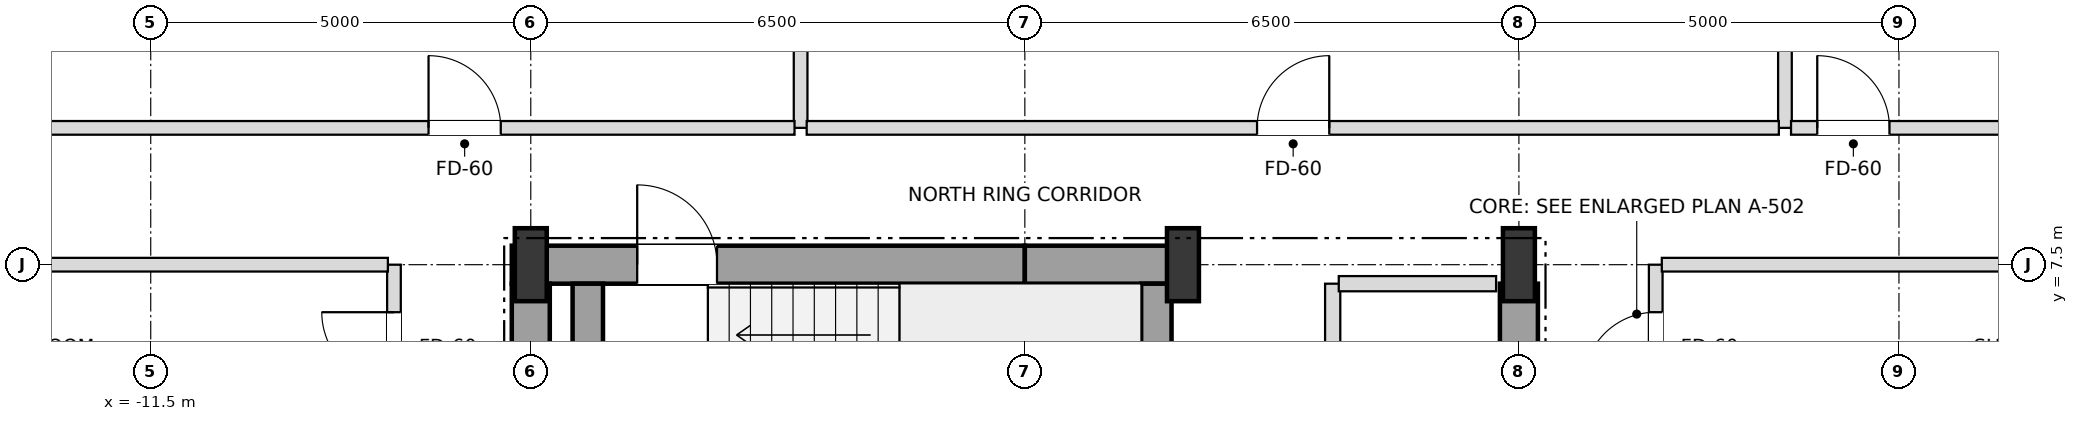
"""IFC4 building model, lengths in metres.
Left out: names, types, materials, properties, quantities, classifications, styles, units other than length and angle.
Written with IfcOpenShell. Run it as: python <this file> out.ifc"""

import sys

from ifc_helpers import new_model, si_unit, direction, frame, frame_2d, origin, origin_2d, place, context, subcontext, project, spatial, rectangle, i_section, extrude, element, fill, save


model = new_model("IFC4")
c1 = context("Model", 3, precision=1e-05, world=origin(), true_north=direction((0.0, 1.0)))
c2 = subcontext(c1, "Body", "Model", "MODEL_VIEW")
j1 = project(units=[si_unit("LENGTHUNIT", "METRE"), si_unit("PLANEANGLEUNIT", "RADIAN")], contexts=[c1])
p1 = place(None, origin())
s1 = spatial("IfcSite", under=j1, at=p1, CompositionType="ELEMENT")
p2 = place(p1, origin())
s2 = spatial("IfcBuilding", under=s1, at=p2, CompositionType="ELEMENT")
p3 = place(p2, frame((0.0, 0.0, 79.2)))
s3 = spatial("IfcBuildingStorey", under=s2, at=p3, CompositionType="ELEMENT", Elevation=79.2)
for number, where, z_axis, x_axis in (
    (1, (-6.5, 7.5, 0.0), (0.0, 0.0, 1.0), (1.0, 0.0, 0.0)),
    (2, (2.08, 7.5, 0.0), (0.0, 0.0, 1.0), (1.0, 0.0, 0.0)),
    (3, (6.5, 7.5, 0.0), (0.0, 0.0, 1.0), (1.0, 0.0, 0.0)),
):
    element("IfcColumn", number, at=place(p3, frame(where, z_axis=z_axis, x_axis=x_axis)), inside=s3, PredefinedType="COLUMN", context=c2, shape_type="SweptSolid", body=[
        extrude(i_section(OverallWidth=0.42, OverallDepth=0.96, WebThickness=0.022, FlangeThickness=0.034, at=origin_2d()), origin(), (0.0, 0.0, 1.0), 3.6),
    ])
p4 = place(p3, frame((-6.75, 7.5, 0.0), z_axis=(0.0, 0.0, 1.0), x_axis=(1.0, 0.0, 0.0)))
e4 = element("IfcWall", 4, at=p4, inside=s3, PredefinedType="SHEAR", context=c2, shape_type="SweptSolid", body=[
    extrude(rectangle(XDim=6.75, YDim=0.5, at=frame_2d((3.375, 0.0))), origin(), (0.0, 0.0, 1.0), 3.38),
])
p5 = place(p4, frame((1.65, 0.0, 0.0)))
e5 = element("IfcOpeningElement", 5, at=p5, cuts=e4, PredefinedType="OPENING", context=c2, shape_type="SweptSolid", body=[
    extrude(rectangle(XDim=1.05, YDim=2.15, at=frame_2d((0.525, 1.075))), frame((0.0, 0.26, 0.0), z_axis=(0.0, -1.0, 0.0), x_axis=(1.0, 0.0, 0.0)), (0.0, 0.0, 1.0), 0.52),
])
p6 = place(p3, frame((0.0, 7.5, 0.0), z_axis=(0.0, 0.0, 1.0), x_axis=(1.0, 0.0, 0.0)))
e6 = element("IfcWall", 6, at=p6, inside=s3, PredefinedType="SHEAR", context=c2, shape_type="SweptSolid", body=[
    extrude(rectangle(XDim=2.08, YDim=0.5, at=frame_2d((1.04, 0.0))), origin(), (0.0, 0.0, 1.0), 3.38),
])
for number, where, z_axis, x_axis in (
    (7, (-6.5, 3.95, 0.0), (0.0, 0.0, 1.0), (0.0, 1.0, 0.0)),
    (8, (6.5, 3.95, 0.0), (0.0, 0.0, 1.0), (0.0, 1.0, 0.0)),
):
    element("IfcWall", number, at=place(p3, frame(where, z_axis=z_axis, x_axis=x_axis)), inside=s3, PredefinedType="SHEAR", context=c2, shape_type="SweptSolid", body=[
        extrude(rectangle(XDim=3.3, YDim=0.5, at=frame_2d((1.65, 0.0))), origin(), (0.0, 0.0, 1.0), 3.38),
    ])
for number, where, z_axis, x_axis in (
    (9, (1.73, 3.95, 0.0), (0.0, 0.0, 1.0), (0.0, 1.0, 0.0)),
    (10, (-5.75, 3.95, 0.0), (0.0, 0.0, 1.0), (0.0, 1.0, 0.0)),
):
    element("IfcWall", number, at=place(p3, frame(where, z_axis=z_axis, x_axis=x_axis)), inside=s3, PredefinedType="SHEAR", context=c2, shape_type="SweptSolid", body=[
        extrude(rectangle(XDim=3.3, YDim=0.4, at=frame_2d((1.65, 0.0))), origin(), (0.0, 0.0, 1.0), 3.38),
    ])
p7 = place(p3, frame((-8.3, -7.5, 0.0), z_axis=(0.0, 0.0, 1.0), x_axis=(0.0, 1.0, 0.0)))
e11 = element("IfcWall", 11, at=p7, inside=s3, PredefinedType="PARTITIONING", context=c2, shape_type="SweptSolid", body=[
    extrude(rectangle(XDim=15.0, YDim=0.18, at=frame_2d((7.5, 0.0))), origin(), (0.0, 0.0, 1.0), 3.38),
])
p8 = place(p7, frame((2.075, 0.0, 0.0)))
e12 = element("IfcOpeningElement", 12, at=p8, cuts=e11, PredefinedType="OPENING", context=c2, shape_type="SweptSolid", body=[
    extrude(rectangle(XDim=0.95, YDim=2.15, at=frame_2d((0.475, 1.075))), frame((0.0, 0.1, 0.0), z_axis=(0.0, -1.0, 0.0), x_axis=(1.0, 0.0, 0.0)), (0.0, 0.0, 1.0), 0.2),
])
p9 = place(p7, frame((8.475, 0.0, 0.0)))
e13 = element("IfcOpeningElement", 13, at=p9, cuts=e11, PredefinedType="OPENING", context=c2, shape_type="SweptSolid", body=[
    extrude(rectangle(XDim=0.95, YDim=2.15, at=frame_2d((0.475, 1.075))), frame((0.0, 0.1, 0.0), z_axis=(0.0, -1.0, 0.0), x_axis=(1.0, 0.0, 0.0)), (0.0, 0.0, 1.0), 0.2),
])
p10 = place(p7, frame((13.425, 0.0, 0.0)))
e14 = element("IfcOpeningElement", 14, at=p10, cuts=e11, PredefinedType="OPENING", context=c2, shape_type="SweptSolid", body=[
    extrude(rectangle(XDim=0.95, YDim=2.15, at=frame_2d((0.475, 1.075))), frame((0.0, 0.1, 0.0), z_axis=(0.0, -1.0, 0.0), x_axis=(1.0, 0.0, 0.0)), (0.0, 0.0, 1.0), 0.2),
])
p11 = place(p3, frame((-2.95, 9.3, 0.0), z_axis=(0.0, 0.0, 1.0), x_axis=(0.0, 1.0, 0.0)))
e15 = element("IfcWall", 15, at=p11, inside=s3, PredefinedType="PARTITIONING", context=c2, shape_type="SweptSolid", body=[
    extrude(rectangle(XDim=15.6, YDim=0.18, at=frame_2d((7.8, 0.0))), origin(), (0.0, 0.0, 1.0), 2.816),
])
p12 = place(p3, frame((4.05, 4.2, 0.0), z_axis=(0.0, 0.0, 1.0), x_axis=(0.0, 1.0, 0.0)))
e16 = element("IfcWall", 16, at=p12, inside=s3, PredefinedType="SOLIDWALL", context=c2, shape_type="SweptSolid", body=[
    extrude(rectangle(XDim=3.05, YDim=0.2, at=frame_2d((1.525, 0.0))), origin(), (0.0, 0.0, 1.0), 3.38),
])
p13 = place(p12, frame((0.975, 0.0, 0.0)))
e17 = element("IfcOpeningElement", 17, at=p13, cuts=e16, PredefinedType="OPENING", context=c2, shape_type="SweptSolid", body=[
    extrude(rectangle(XDim=0.95, YDim=2.15, at=frame_2d((0.475, 1.075))), frame((0.0, 0.11, 0.0), z_axis=(0.0, -1.0, 0.0), x_axis=(1.0, 0.0, 0.0)), (0.0, 0.0, 1.0), 0.22),
])
p14 = place(p3, frame((8.3, -7.5, 0.0), z_axis=(0.0, 0.0, 1.0), x_axis=(0.0, 1.0, 0.0)))
e18 = element("IfcWall", 18, at=p14, inside=s3, PredefinedType="PARTITIONING", context=c2, shape_type="SweptSolid", body=[
    extrude(rectangle(XDim=15.0, YDim=0.18, at=frame_2d((7.5, 0.0))), origin(), (0.0, 0.0, 1.0), 3.38),
])
p15 = place(p14, frame((2.075, 0.0, 0.0)))
e19 = element("IfcOpeningElement", 19, at=p15, cuts=e18, PredefinedType="OPENING", context=c2, shape_type="SweptSolid", body=[
    extrude(rectangle(XDim=0.95, YDim=2.15, at=frame_2d((0.475, 1.075))), frame((0.0, 0.1, 0.0), z_axis=(0.0, -1.0, 0.0), x_axis=(1.0, 0.0, 0.0)), (0.0, 0.0, 1.0), 0.2),
])
p16 = place(p14, frame((8.475, 0.0, 0.0)))
e20 = element("IfcOpeningElement", 20, at=p16, cuts=e18, PredefinedType="OPENING", context=c2, shape_type="SweptSolid", body=[
    extrude(rectangle(XDim=0.95, YDim=2.15, at=frame_2d((0.475, 1.075))), frame((0.0, 0.1, 0.0), z_axis=(0.0, -1.0, 0.0), x_axis=(1.0, 0.0, 0.0)), (0.0, 0.0, 1.0), 0.2),
])
p17 = place(p14, frame((13.425, 0.0, 0.0)))
e21 = element("IfcOpeningElement", 21, at=p17, cuts=e18, PredefinedType="OPENING", context=c2, shape_type="SweptSolid", body=[
    extrude(rectangle(XDim=0.95, YDim=2.15, at=frame_2d((0.475, 1.075))), frame((0.0, 0.1, 0.0), z_axis=(0.0, -1.0, 0.0), x_axis=(1.0, 0.0, 0.0)), (0.0, 0.0, 1.0), 0.2),
])
p18 = place(p3, frame((10.0, 9.3, 0.0), z_axis=(0.0, 0.0, 1.0), x_axis=(0.0, 1.0, 0.0)))
e22 = element("IfcWall", 22, at=p18, inside=s3, PredefinedType="PARTITIONING", context=c2, shape_type="SweptSolid", body=[
    extrude(rectangle(XDim=15.6, YDim=0.18, at=frame_2d((7.8, 0.0))), origin(), (0.0, 0.0, 1.0), 2.816),
])
p19 = place(p3, frame((4.13, 7.25, 0.0), z_axis=(0.0, 0.0, 1.0), x_axis=(1.0, 0.0, 0.0)))
e23 = element("IfcWall", 23, at=p19, inside=s3, PredefinedType="SOLIDWALL", context=c2, shape_type="SweptSolid", body=[
    extrude(rectangle(XDim=2.07, YDim=0.2, at=frame_2d((1.035, 0.0))), origin(), (0.0, 0.0, 1.0), 3.38),
])
for number, where, z_axis, x_axis in (
    (24, (-21.9, 7.5, 0.0), (0.0, 0.0, 1.0), (1.0, 0.0, 0.0)),
    (25, (8.38, 7.5, 0.0), (0.0, 0.0, 1.0), (1.0, 0.0, 0.0)),
):
    element("IfcWall", number, at=place(p3, frame(where, z_axis=z_axis, x_axis=x_axis)), inside=s3, PredefinedType="PARTITIONING", context=c2, shape_type="SweptSolid", body=[
        extrude(rectangle(XDim=13.52, YDim=0.18, at=frame_2d((6.76, 0.0))), origin(), (0.0, 0.0, 1.0), 2.816),
    ])
p20 = place(p3, frame((-18.4, 9.3, 0.0), z_axis=(0.0, 0.0, 1.0), x_axis=(1.0, 0.0, 0.0)))
e26 = element("IfcWall", 26, at=p20, inside=s3, PredefinedType="PARTITIONING", context=c2, shape_type="SweptSolid", body=[
    extrude(rectangle(XDim=15.37, YDim=0.18, at=frame_2d((7.685, 0.0))), origin(), (0.0, 0.0, 1.0), 2.816),
])
p21 = place(p20, frame((10.555, 0.0, 0.0)))
e27 = element("IfcOpeningElement", 27, at=p21, cuts=e26, PredefinedType="OPENING", context=c2, shape_type="SweptSolid", body=[
    extrude(rectangle(XDim=0.95, YDim=2.15, at=frame_2d((0.475, 1.075))), frame((0.0, 0.1, 0.0), z_axis=(0.0, -1.0, 0.0), x_axis=(1.0, 0.0, 0.0)), (0.0, 0.0, 1.0), 0.2),
])
p22 = place(p3, frame((-2.87, 9.3, 0.0), z_axis=(0.0, 0.0, 1.0), x_axis=(1.0, 0.0, 0.0)))
e28 = element("IfcWall", 28, at=p22, inside=s3, PredefinedType="PARTITIONING", context=c2, shape_type="SweptSolid", body=[
    extrude(rectangle(XDim=12.79, YDim=0.18, at=frame_2d((6.395, 0.0))), origin(), (0.0, 0.0, 1.0), 2.816),
])
p23 = place(p22, frame((5.925, 0.0, 0.0)))
e29 = element("IfcOpeningElement", 29, at=p23, cuts=e28, PredefinedType="OPENING", context=c2, shape_type="SweptSolid", body=[
    extrude(rectangle(XDim=0.95, YDim=2.15, at=frame_2d((0.475, 1.075))), frame((0.0, 0.1, 0.0), z_axis=(0.0, -1.0, 0.0), x_axis=(1.0, 0.0, 0.0)), (0.0, 0.0, 1.0), 0.2),
])
p24 = place(p3, frame((10.08, 9.3, 0.0), z_axis=(0.0, 0.0, 1.0), x_axis=(1.0, 0.0, 0.0)))
e30 = element("IfcWall", 30, at=p24, inside=s3, PredefinedType="PARTITIONING", context=c2, shape_type="SweptSolid", body=[
    extrude(rectangle(XDim=8.32, YDim=0.18, at=frame_2d((4.16, 0.0))), origin(), (0.0, 0.0, 1.0), 2.816),
])
p25 = place(p24, frame((0.345, 0.0, 0.0)))
e31 = element("IfcOpeningElement", 31, at=p25, cuts=e30, PredefinedType="OPENING", context=c2, shape_type="SweptSolid", body=[
    extrude(rectangle(XDim=0.95, YDim=2.15, at=frame_2d((0.475, 1.075))), frame((0.0, 0.1, 0.0), z_axis=(0.0, -1.0, 0.0), x_axis=(1.0, 0.0, 0.0)), (0.0, 0.0, 1.0), 0.2),
])
p26 = place(p5, origin())
e32 = element("IfcDoor", 32, at=p26, inside=s3, OperationType="SINGLE_SWING_LEFT", PredefinedType="DOOR", context=c2, shape_type="SweptSolid", body=[
    extrude(rectangle(XDim=1.05, YDim=2.15, at=frame_2d((0.525, 1.075))), frame((0.0, 0.025, 0.0), z_axis=(0.0, -1.0, 0.0), x_axis=(1.0, 0.0, 0.0)), (0.0, 0.0, 1.0), 0.05),
])
fill(e5, e32)
p27 = place(p21, origin())
e33 = element("IfcDoor", 33, at=p27, inside=s3, OperationType="SINGLE_SWING_LEFT", PredefinedType="DOOR", context=c2, shape_type="SweptSolid", body=[
    extrude(rectangle(XDim=0.95, YDim=2.15, at=frame_2d((0.475, 1.075))), frame((0.0, 0.025, 0.0), z_axis=(0.0, -1.0, 0.0), x_axis=(1.0, 0.0, 0.0)), (0.0, 0.0, 1.0), 0.05),
])
fill(e27, e33)
p28 = place(p23, origin())
e34 = element("IfcDoor", 34, at=p28, inside=s3, OperationType="SINGLE_SWING_RIGHT", PredefinedType="DOOR", context=c2, shape_type="SweptSolid", body=[
    extrude(rectangle(XDim=0.95, YDim=2.15, at=frame_2d((0.475, 1.075))), frame((0.0, 0.025, 0.0), z_axis=(0.0, -1.0, 0.0), x_axis=(1.0, 0.0, 0.0)), (0.0, 0.0, 1.0), 0.05),
])
fill(e29, e34)
p29 = place(p25, origin())
e35 = element("IfcDoor", 35, at=p29, inside=s3, OperationType="SINGLE_SWING_LEFT", PredefinedType="DOOR", context=c2, shape_type="SweptSolid", body=[
    extrude(rectangle(XDim=0.95, YDim=2.15, at=frame_2d((0.475, 1.075))), frame((0.0, 0.025, 0.0), z_axis=(0.0, -1.0, 0.0), x_axis=(1.0, 0.0, 0.0)), (0.0, 0.0, 1.0), 0.05),
])
fill(e31, e35)
p30 = place(p10, origin())
e36 = element("IfcDoor", 36, at=p30, inside=s3, OperationType="SINGLE_SWING_RIGHT", PredefinedType="DOOR", context=c2, shape_type="SweptSolid", body=[
    extrude(rectangle(XDim=0.95, YDim=2.15, at=frame_2d((0.475, 1.075))), frame((0.0, 0.025, 0.0), z_axis=(0.0, -1.0, 0.0), x_axis=(1.0, 0.0, 0.0)), (0.0, 0.0, 1.0), 0.05),
])
fill(e14, e36)
p31 = place(p17, origin())
e37 = element("IfcDoor", 37, at=p31, inside=s3, OperationType="SINGLE_SWING_LEFT", PredefinedType="DOOR", context=c2, shape_type="SweptSolid", body=[
    extrude(rectangle(XDim=0.95, YDim=2.15, at=frame_2d((0.475, 1.075))), frame((0.0, 0.025, 0.0), z_axis=(0.0, -1.0, 0.0), x_axis=(1.0, 0.0, 0.0)), (0.0, 0.0, 1.0), 0.05),
])
fill(e21, e37)
save(model, sys.argv[1])
